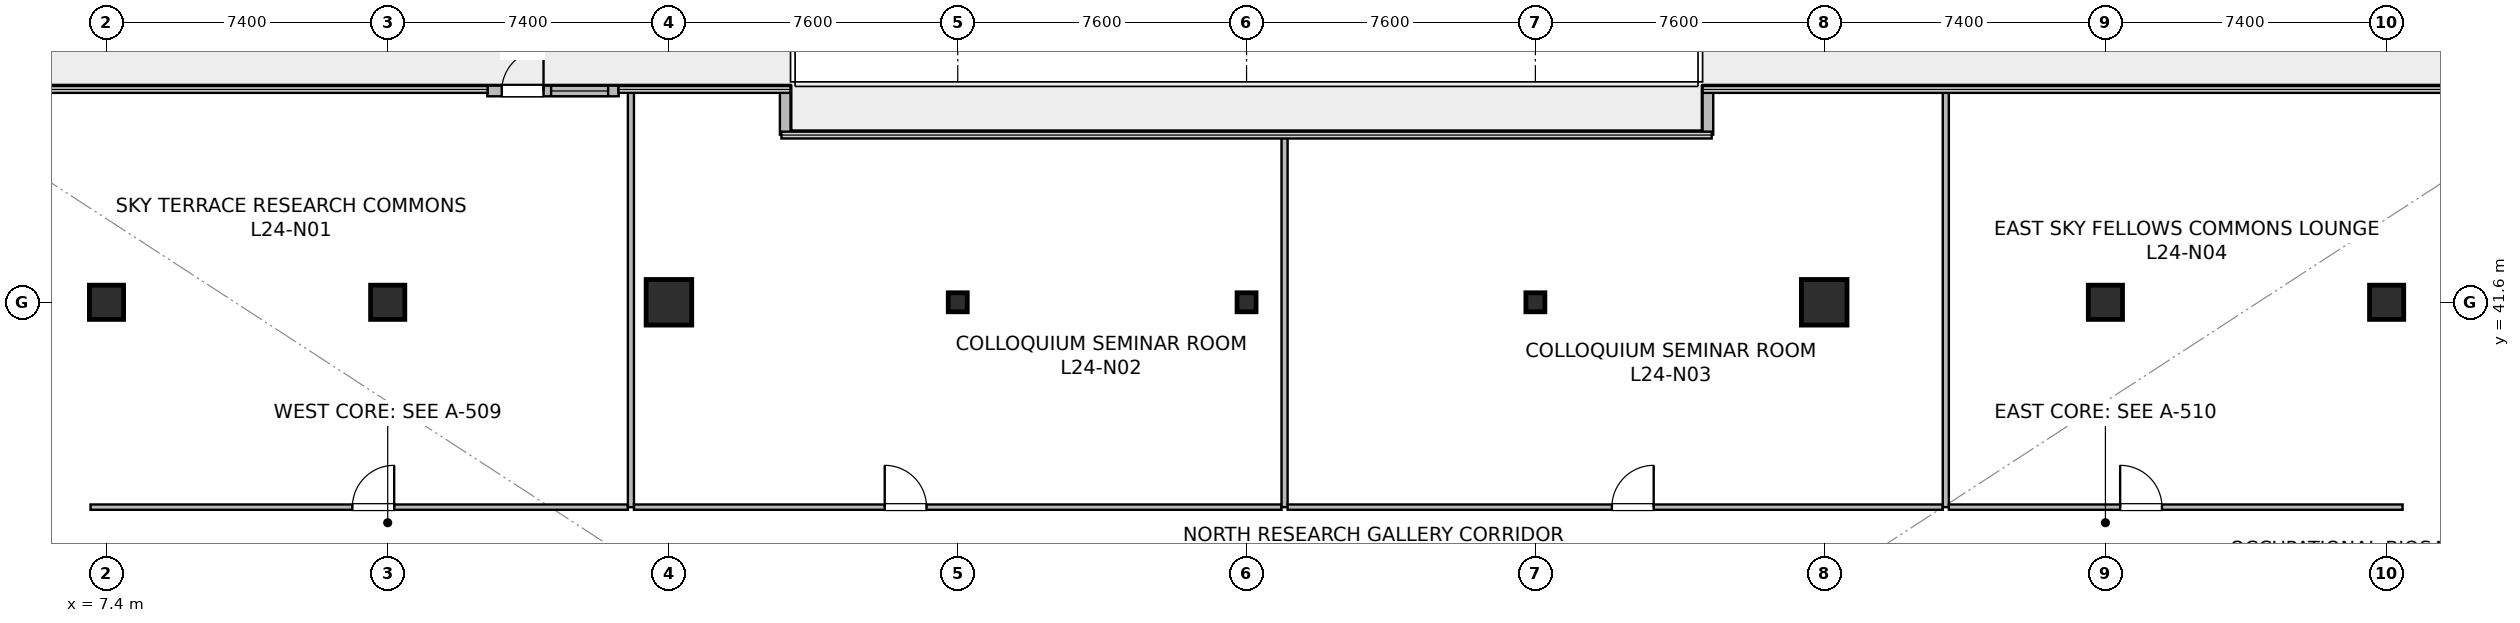
"""IFC4 building model, lengths in metres.
Left out: names, types, materials, properties, quantities, classifications, styles, units other than length and angle.
Written with IfcOpenShell. Run it as: python <this file> out.ifc"""

import sys

from ifc_helpers import new_model, si_unit, direction, frame, frame_2d, origin, origin_2d, place, context, subcontext, project, spatial, rectangle, hollow_rectangle, extrude, source, transform, mapped, element, fill, save


model = new_model("IFC4")
c1 = context("Model", 3, precision=1e-05, world=origin(), true_north=direction((0.0, 1.0)))
c2 = subcontext(c1, "Body", "Model", "MODEL_VIEW")
j1 = project(units=[si_unit("LENGTHUNIT", "METRE"), si_unit("PLANEANGLEUNIT", "RADIAN")], contexts=[c1])
p1 = place(None, origin())
s1 = spatial("IfcSite", under=j1, at=p1, CompositionType="ELEMENT")
p2 = place(p1, origin())
s2 = spatial("IfcBuilding", under=s1, at=p2, CompositionType="ELEMENT")
p3 = place(p2, frame((0.0, 0.0, 100.3)))
s3 = spatial("IfcBuildingStorey", under=s2, at=p3, CompositionType="ELEMENT", Elevation=100.3)
m1 = source(origin(), c2, "Body", "SweptSolid", [
    extrude(rectangle(XDim=0.9, YDim=0.9, at=origin_2d()), origin(), (0.0, 0.0, 1.0), 4.8),
])
p4 = place(p3, frame((14.8, 41.6, 0.0), z_axis=(0.0, 0.0, 1.0), x_axis=(1.0, 0.0, 0.0)))
e1 = element("IfcColumn", 1, at=p4, inside=s3, PredefinedType="COLUMN", context=c2, shape_type="MappedRepresentation", body=[
    mapped(m1, transform((0.0, 0.0, 0.0), scale=1.0)),
])
m2 = source(origin(), c2, "Body", "SweptSolid", [
    extrude(rectangle(XDim=1.2, YDim=1.2, at=origin_2d()), origin(), (0.0, 0.0, 1.0), 4.8),
])
for number, where, z_axis, x_axis in (
    (2, (22.2, 41.6, 0.0), (0.0, 0.0, 1.0), (1.0, 0.0, 0.0)),
    (3, (52.6, 41.6, 0.0), (0.0, 0.0, 1.0), (1.0, 0.0, 0.0)),
):
    element("IfcColumn", number, at=place(p3, frame(where, z_axis=z_axis, x_axis=x_axis)), inside=s3, PredefinedType="COLUMN", context=c2, shape_type="MappedRepresentation", body=[
        mapped(m2, transform((0.0, 0.0, 0.0), scale=1.0)),
    ])
for number, where, z_axis, x_axis in (
    (4, (60.0, 41.6, 0.0), (0.0, 0.0, 1.0), (1.0, 0.0, 0.0)),
    (5, (7.4, 41.6, 0.0), (0.0, 0.0, 1.0), (1.0, 0.0, 0.0)),
    (6, (67.4, 41.6, 0.0), (0.0, 0.0, 1.0), (1.0, 0.0, 0.0)),
):
    element("IfcColumn", number, at=place(p3, frame(where, z_axis=z_axis, x_axis=x_axis)), inside=s3, PredefinedType="COLUMN", context=c2, shape_type="MappedRepresentation", body=[
        mapped(m1, transform((0.0, 0.0, 0.0), scale=1.0)),
    ])
m3 = source(origin(), c2, "Body", "SweptSolid", [
    extrude(hollow_rectangle(XDim=0.5, YDim=0.5, WallThickness=0.022, at=origin_2d()), origin(), (0.0, 0.0, 1.0), 4.8),
])
for number, where, z_axis, x_axis in (
    (7, (29.8, 41.6, 0.0), (0.0, 0.0, 1.0), (1.0, 0.0, 0.0)),
    (8, (37.4, 41.6, 0.0), (0.0, 0.0, 1.0), (1.0, 0.0, 0.0)),
    (9, (45.0, 41.6, 0.0), (0.0, 0.0, 1.0), (1.0, 0.0, 0.0)),
):
    element("IfcColumn", number, at=place(p3, frame(where, z_axis=z_axis, x_axis=x_axis)), inside=s3, PredefinedType="COLUMN", context=c2, shape_type="MappedRepresentation", body=[
        mapped(m3, transform((0.0, 0.0, 0.0), scale=1.0)),
    ])
p5 = place(p3, frame((17.422, 47.16, 0.0), z_axis=(0.0, 0.0, 1.0), x_axis=(1.0, 0.0, 0.0)))
e10 = element("IfcWall", 10, at=p5, inside=s3, PredefinedType="STANDARD", context=c2, shape_type="SweptSolid", body=[
    extrude(rectangle(XDim=3.456, YDim=0.28, at=frame_2d((1.728, 0.0))), origin(), (0.0, 0.0, 1.0), 4.49),
])
p6 = place(p5, frame((0.378, 0.0, 0.0)))
e11 = element("IfcOpeningElement", 11, at=p6, cuts=e10, PredefinedType="OPENING", context=c2, shape_type="SweptSolid", body=[
    extrude(rectangle(XDim=1.1, YDim=2.2, at=frame_2d((0.55, 1.1))), frame((0.0, 0.15, 0.0), z_axis=(0.0, -1.0, 0.0), x_axis=(1.0, 0.0, 0.0)), (0.0, 0.0, 1.0), 0.3),
])
p7 = place(p5, frame((1.678, 0.0, 0.9)))
e12 = element("IfcOpeningElement", 12, at=p7, cuts=e10, PredefinedType="OPENING", context=c2, shape_type="SweptSolid", body=[
    extrude(rectangle(XDim=1.5, YDim=2.2, at=frame_2d((0.75, 1.1))), frame((0.0, 0.15, 0.0), z_axis=(0.0, -1.0, 0.0), x_axis=(1.0, 0.0, 0.0)), (0.0, 0.0, 1.0), 0.3),
])
for number, where, z_axis, x_axis in (
    (13, (49.54, 47.3, 0.0), (0.0, 0.0, 1.0), (0.0, -1.0, 0.0)),
    (14, (25.26, 46.012, 0.0), (0.0, 0.0, 1.0), (0.0, 1.0, 0.0)),
):
    element("IfcWall", number, at=place(p3, frame(where, z_axis=z_axis, x_axis=x_axis)), inside=s3, PredefinedType="STANDARD", context=c2, shape_type="SweptSolid", body=[
        extrude(rectangle(XDim=1.288, YDim=0.28, at=frame_2d((0.644, 0.0))), origin(), (0.0, 0.0, 1.0), 4.49),
    ])
p8 = place(p3, frame((6.98, 36.21, 0.0), z_axis=(0.0, 0.0, 1.0), x_axis=(1.0, 0.0, 0.0)))
e15 = element("IfcWall", 15, at=p8, inside=s3, PredefinedType="PARTITIONING", context=c2, shape_type="SweptSolid", body=[
    extrude(rectangle(XDim=14.14, YDim=0.14, at=frame_2d((7.07, 0.0))), origin(), (0.0, 0.0, 1.0), 3.825),
])
p9 = place(p8, frame((6.89, 0.0, 0.0)))
e16 = element("IfcOpeningElement", 16, at=p9, cuts=e15, PredefinedType="OPENING", context=c2, shape_type="SweptSolid", body=[
    extrude(rectangle(XDim=1.1, YDim=2.18, at=frame_2d((0.55, 1.09))), frame((0.0, 0.08, 0.0), z_axis=(0.0, -1.0, 0.0), x_axis=(1.0, 0.0, 0.0)), (0.0, 0.0, 1.0), 0.16),
])
p10 = place(p3, frame((21.2, 36.21, 0.0), z_axis=(0.0, 0.0, 1.0), x_axis=(0.0, 1.0, 0.0)))
e17 = element("IfcWall", 17, at=p10, inside=s3, PredefinedType="PARTITIONING", context=c2, shape_type="SweptSolid", body=[
    extrude(rectangle(XDim=10.98, YDim=0.16, at=frame_2d((5.49, 0.0))), origin(), (0.0, 0.0, 1.0), 3.775),
])
p11 = place(p3, frame((21.28, 36.21, 0.0), z_axis=(0.0, 0.0, 1.0), x_axis=(1.0, 0.0, 0.0)))
e18 = element("IfcWall", 18, at=p11, inside=s3, PredefinedType="PARTITIONING", context=c2, shape_type="SweptSolid", body=[
    extrude(rectangle(XDim=17.04, YDim=0.14, at=frame_2d((8.52, 0.0))), origin(), (0.0, 0.0, 1.0), 3.825),
])
p12 = place(p11, frame((6.598, 0.0, 0.0)))
e19 = element("IfcOpeningElement", 19, at=p12, cuts=e18, PredefinedType="OPENING", context=c2, shape_type="SweptSolid", body=[
    extrude(rectangle(XDim=1.1, YDim=2.18, at=frame_2d((0.55, 1.09))), frame((0.0, 0.08, 0.0), z_axis=(0.0, -1.0, 0.0), x_axis=(1.0, 0.0, 0.0)), (0.0, 0.0, 1.0), 0.16),
])
p13 = place(p3, frame((38.4, 36.21, 0.0), z_axis=(0.0, 0.0, 1.0), x_axis=(0.0, 1.0, 0.0)))
e20 = element("IfcWall", 20, at=p13, inside=s3, PredefinedType="PARTITIONING", context=c2, shape_type="SweptSolid", body=[
    extrude(rectangle(XDim=9.78, YDim=0.16, at=frame_2d((4.89, 0.0))), origin(), (0.0, 0.0, 1.0), 3.775),
])
p14 = place(p3, frame((38.48, 36.21, 0.0), z_axis=(0.0, 0.0, 1.0), x_axis=(1.0, 0.0, 0.0)))
e21 = element("IfcWall", 21, at=p14, inside=s3, PredefinedType="PARTITIONING", context=c2, shape_type="SweptSolid", body=[
    extrude(rectangle(XDim=17.24, YDim=0.14, at=frame_2d((8.62, 0.0))), origin(), (0.0, 0.0, 1.0), 3.825),
])
p15 = place(p14, frame((8.533, 0.0, 0.0)))
e22 = element("IfcOpeningElement", 22, at=p15, cuts=e21, PredefinedType="OPENING", context=c2, shape_type="SweptSolid", body=[
    extrude(rectangle(XDim=1.1, YDim=2.18, at=frame_2d((0.55, 1.09))), frame((0.0, 0.08, 0.0), z_axis=(0.0, -1.0, 0.0), x_axis=(1.0, 0.0, 0.0)), (0.0, 0.0, 1.0), 0.16),
])
p16 = place(p3, frame((55.8, 36.21, 0.0), z_axis=(0.0, 0.0, 1.0), x_axis=(0.0, 1.0, 0.0)))
e23 = element("IfcWall", 23, at=p16, inside=s3, PredefinedType="PARTITIONING", context=c2, shape_type="SweptSolid", body=[
    extrude(rectangle(XDim=10.98, YDim=0.16, at=frame_2d((5.49, 0.0))), origin(), (0.0, 0.0, 1.0), 3.775),
])
p17 = place(p3, frame((55.88, 36.21, 0.0), z_axis=(0.0, 0.0, 1.0), x_axis=(1.0, 0.0, 0.0)))
e24 = element("IfcWall", 24, at=p17, inside=s3, PredefinedType="PARTITIONING", context=c2, shape_type="SweptSolid", body=[
    extrude(rectangle(XDim=11.94, YDim=0.14, at=frame_2d((5.97, 0.0))), origin(), (0.0, 0.0, 1.0), 3.825),
])
p18 = place(p17, frame((4.507, 0.0, 0.0)))
e25 = element("IfcOpeningElement", 25, at=p18, cuts=e24, PredefinedType="OPENING", context=c2, shape_type="SweptSolid", body=[
    extrude(rectangle(XDim=1.1, YDim=2.18, at=frame_2d((0.55, 1.09))), frame((0.0, 0.08, 0.0), z_axis=(0.0, -1.0, 0.0), x_axis=(1.0, 0.0, 0.0)), (0.0, 0.0, 1.0), 0.16),
])
m4 = source(origin(), c2, "Body", "SweptSolid", [
    extrude(rectangle(XDim=1.1, YDim=2.2, at=frame_2d((0.55, 1.1))), frame((0.0, 0.025, 0.0), z_axis=(0.0, -1.0, 0.0), x_axis=(1.0, 0.0, 0.0)), (0.0, 0.0, 1.0), 0.05),
])
p19 = place(p6, origin())
e26 = element("IfcDoor", 26, at=p19, inside=s3, OperationType="SINGLE_SWING_RIGHT", PredefinedType="DOOR", context=c2, shape_type="MappedRepresentation", body=[
    mapped(m4, transform((0.0, 0.0, 0.0), scale=1.0)),
])
fill(e11, e26)
m5 = source(origin(), c2, "Body", "SweptSolid", [
    extrude(rectangle(XDim=1.5, YDim=2.2, at=frame_2d((0.75, 1.1))), frame((0.0, 0.03, 0.0), z_axis=(0.0, -1.0, 0.0), x_axis=(1.0, 0.0, 0.0)), (0.0, 0.0, 1.0), 0.06),
])
p20 = place(p7, origin())
e27 = element("IfcWindow", 27, at=p20, inside=s3, PartitioningType="SINGLE_PANEL", PredefinedType="WINDOW", context=c2, shape_type="MappedRepresentation", body=[
    mapped(m5, transform((0.0, 0.0, 0.0), scale=1.0)),
])
fill(e12, e27)
m6 = source(origin(), c2, "Body", "SweptSolid", [
    extrude(rectangle(XDim=1.1, YDim=2.18, at=frame_2d((0.55, 1.09))), frame((0.0, 0.025, 0.0), z_axis=(0.0, -1.0, 0.0), x_axis=(1.0, 0.0, 0.0)), (0.0, 0.0, 1.0), 0.05),
])
p21 = place(p9, origin())
e28 = element("IfcDoor", 28, at=p21, inside=s3, OperationType="SINGLE_SWING_RIGHT", PredefinedType="DOOR", context=c2, shape_type="MappedRepresentation", body=[
    mapped(m6, transform((0.0, 0.0, 0.0), scale=1.0)),
])
fill(e16, e28)
p22 = place(p12, origin())
e29 = element("IfcDoor", 29, at=p22, inside=s3, OperationType="SINGLE_SWING_LEFT", PredefinedType="DOOR", context=c2, shape_type="MappedRepresentation", body=[
    mapped(m6, transform((0.0, 0.0, 0.0), scale=1.0)),
])
fill(e19, e29)
p23 = place(p15, origin())
e30 = element("IfcDoor", 30, at=p23, inside=s3, OperationType="SINGLE_SWING_RIGHT", PredefinedType="DOOR", context=c2, shape_type="MappedRepresentation", body=[
    mapped(m6, transform((0.0, 0.0, 0.0), scale=1.0)),
])
fill(e22, e30)
p24 = place(p18, origin())
e31 = element("IfcDoor", 31, at=p24, inside=s3, OperationType="SINGLE_SWING_LEFT", PredefinedType="DOOR", context=c2, shape_type="MappedRepresentation", body=[
    mapped(m6, transform((0.0, 0.0, 0.0), scale=1.0)),
])
fill(e25, e31)
save(model, sys.argv[1])
